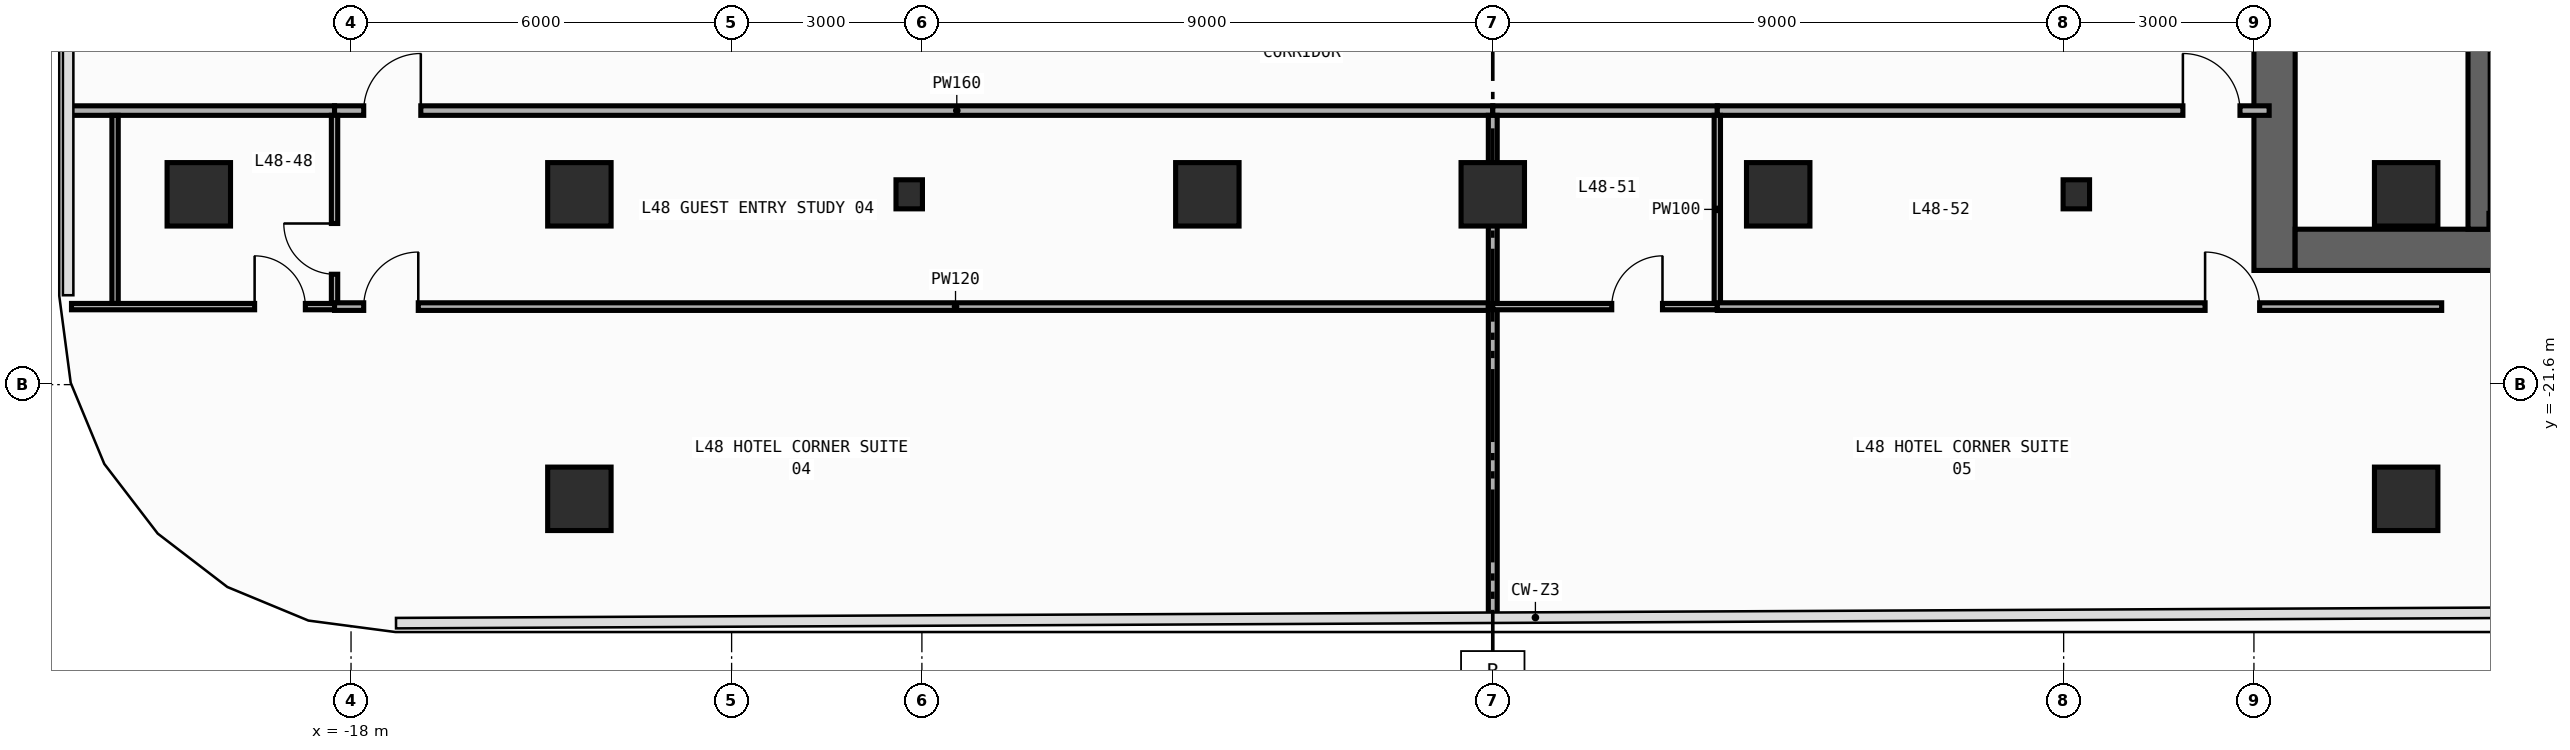
"""IFC4 building model, lengths in metres.
Left out: names, types, materials, properties, quantities, classifications, styles, units other than length and angle.
Written with IfcOpenShell. Run it as: python <this file> out.ifc"""

import sys

from ifc_helpers import new_model, si_unit, direction, frame, frame_2d, origin, origin_2d, place, context, subcontext, project, spatial, rectangle, i_section, extrude, element, fill, save


model = new_model("IFC4")
c1 = context("Model", 3, precision=1e-05, world=origin(), true_north=direction((0.0, 1.0)))
c2 = subcontext(c1, "Body", "Model", "MODEL_VIEW")
j1 = project(units=[si_unit("LENGTHUNIT", "METRE"), si_unit("PLANEANGLEUNIT", "RADIAN")], contexts=[c1])
p1 = place(None, origin())
s1 = spatial("IfcSite", under=j1, at=p1, CompositionType="ELEMENT")
p2 = place(p1, origin())
s2 = spatial("IfcBuilding", under=s1, at=p2, CompositionType="ELEMENT")
p3 = place(p2, frame((0.0, 0.0, 206.8)))
s3 = spatial("IfcBuildingStorey", under=s2, at=p3, CompositionType="ELEMENT", Elevation=206.8)
p4 = place(p3, frame((12.325, -19.8, 0.0), z_axis=(0.0, 0.0, 1.0), x_axis=(0.0, 1.0, 0.0)))
e1 = element("IfcWall", 1, at=p4, inside=s3, PredefinedType="SHEAR", context=c2, shape_type="SweptSolid", body=[
    extrude(rectangle(XDim=27.0, YDim=0.65, at=frame_2d((13.5, 0.0))), origin(), (0.0, 0.0, 1.0), 3.54),
])
p5 = place(p4, frame((23.05, 0.0, 0.0)))
e2 = element("IfcOpeningElement", 2, at=p5, cuts=e1, PredefinedType="OPENING", context=c2, shape_type="SweptSolid", body=[
    extrude(rectangle(XDim=1.1, YDim=2.2, at=frame_2d((0.55, 1.1))), frame((0.0, 0.335, 0.0), z_axis=(0.0, -1.0, 0.0), x_axis=(1.0, 0.0, 0.0)), (0.0, 0.0, 1.0), 0.67),
])
p6 = place(p4, frame((19.85, 0.0, 0.0)))
e3 = element("IfcOpeningElement", 3, at=p6, cuts=e1, PredefinedType="OPENING", context=c2, shape_type="SweptSolid", body=[
    extrude(rectangle(XDim=1.1, YDim=2.2, at=frame_2d((0.55, 1.1))), frame((0.0, 0.335, 0.0), z_axis=(0.0, -1.0, 0.0), x_axis=(1.0, 0.0, 0.0)), (0.0, 0.0, 1.0), 0.67),
])
p7 = place(p4, frame((16.65, 0.0, 0.0)))
e4 = element("IfcOpeningElement", 4, at=p7, cuts=e1, PredefinedType="OPENING", context=c2, shape_type="SweptSolid", body=[
    extrude(rectangle(XDim=1.1, YDim=2.2, at=frame_2d((0.55, 1.1))), frame((0.0, 0.335, 0.0), z_axis=(0.0, -1.0, 0.0), x_axis=(1.0, 0.0, 0.0)), (0.0, 0.0, 1.0), 0.67),
])
p8 = place(p4, frame((7.175, 0.0, 0.0)))
e5 = element("IfcOpeningElement", 5, at=p8, cuts=e1, PredefinedType="OPENING", context=c2, shape_type="SweptSolid", body=[
    extrude(rectangle(XDim=0.85, YDim=2.1, at=frame_2d((0.425, 1.05))), frame((0.0, 0.335, 0.0), z_axis=(0.0, -1.0, 0.0), x_axis=(1.0, 0.0, 0.0)), (0.0, 0.0, 1.0), 0.67),
])
p9 = place(p4, frame((10.375, 0.0, 0.0)))
e6 = element("IfcOpeningElement", 6, at=p9, cuts=e1, PredefinedType="OPENING", context=c2, shape_type="SweptSolid", body=[
    extrude(rectangle(XDim=0.85, YDim=2.1, at=frame_2d((0.425, 1.05))), frame((0.0, 0.335, 0.0), z_axis=(0.0, -1.0, 0.0), x_axis=(1.0, 0.0, 0.0)), (0.0, 0.0, 1.0), 0.67),
])
p10 = place(p4, frame((12.725, 0.0, 0.0)))
e7 = element("IfcOpeningElement", 7, at=p10, cuts=e1, PredefinedType="OPENING", context=c2, shape_type="SweptSolid", body=[
    extrude(rectangle(XDim=1.15, YDim=2.2, at=frame_2d((0.575, 1.1))), frame((0.0, 0.335, 0.0), z_axis=(0.0, -1.0, 0.0), x_axis=(1.0, 0.0, 0.0)), (0.0, 0.0, 1.0), 0.67),
])
p11 = place(p4, frame((25.125, 0.0, 0.0)))
e8 = element("IfcOpeningElement", 8, at=p11, cuts=e1, PredefinedType="OPENING", context=c2, shape_type="SweptSolid", body=[
    extrude(rectangle(XDim=0.85, YDim=2.1, at=frame_2d((0.425, 1.05))), frame((0.0, 0.335, 0.0), z_axis=(0.0, -1.0, 0.0), x_axis=(1.0, 0.0, 0.0)), (0.0, 0.0, 1.0), 0.67),
])
p12 = place(p3, frame((12.65, -19.475, 0.0), z_axis=(0.0, 0.0, 1.0), x_axis=(1.0, 0.0, 0.0)))
e9 = element("IfcWall", 9, at=p12, inside=s3, PredefinedType="SHEAR", context=c2, shape_type="SweptSolid", body=[
    extrude(rectangle(XDim=7.1, YDim=0.65, at=frame_2d((3.55, 0.0))), origin(), (0.0, 0.0, 1.0), 3.54),
])
p13 = place(p3, frame((15.55, -19.15, 0.0), z_axis=(0.0, 0.0, 1.0), x_axis=(0.0, 1.0, 0.0)))
e10 = element("IfcWall", 10, at=p13, inside=s3, PredefinedType="SHEAR", context=c2, shape_type="SweptSolid", body=[
    extrude(rectangle(XDim=25.7, YDim=0.35, at=frame_2d((12.85, 0.0))), origin(), (0.0, 0.0, 1.0), 3.54),
])
p14 = place(p13, frame((12.075, 0.0, 0.0)))
e11 = element("IfcOpeningElement", 11, at=p14, cuts=e10, PredefinedType="OPENING", context=c2, shape_type="SweptSolid", body=[
    extrude(rectangle(XDim=1.15, YDim=2.2, at=frame_2d((0.575, 1.1))), frame((0.0, 0.185, 0.0), z_axis=(0.0, -1.0, 0.0), x_axis=(1.0, 0.0, 0.0)), (0.0, 0.0, 1.0), 0.37),
])
p15 = place(p13, frame((24.475, 0.0, 0.0)))
e12 = element("IfcOpeningElement", 12, at=p15, cuts=e10, PredefinedType="OPENING", context=c2, shape_type="SweptSolid", body=[
    extrude(rectangle(XDim=0.85, YDim=2.1, at=frame_2d((0.425, 1.05))), frame((0.0, 0.185, 0.0), z_axis=(0.0, -1.0, 0.0), x_axis=(1.0, 0.0, 0.0)), (0.0, 0.0, 1.0), 0.37),
])
p16 = place(p3, frame((15.705, -19.01, 0.0), z_axis=(0.0, 0.0, 1.0), x_axis=(1.0, 0.0, 0.0)))
e13 = element("IfcWall", 13, at=p16, inside=s3, PredefinedType="SHEAR", context=c2, shape_type="SweptSolid", body=[
    extrude(rectangle(XDim=4.065, YDim=0.22, at=frame_2d((2.032, 0.0))), origin(), (0.0, 0.0, 1.0), 3.54),
])
for number, where, z_axis, x_axis in (
    (14, (-9.2, -18.6, 0.0), (0.0, 0.0, 1.0), (1.0, 0.0, 0.0)),
    (15, (9.2, -18.6, 0.0), (0.0, 0.0, 1.0), (1.0, 0.0, 0.0)),
):
    element("IfcColumn", number, at=place(p3, frame(where, z_axis=z_axis, x_axis=x_axis)), inside=s3, PredefinedType="COLUMN", context=c2, shape_type="SweptSolid", body=[
        extrude(i_section(OverallWidth=0.417, OverallDepth=0.458, WebThickness=0.03, FlangeThickness=0.05, FilletRadius=0.022, at=origin_2d()), origin(), (0.0, 0.0, 1.0), 3.8),
    ])
for number, where, z_axis, x_axis in (
    (16, (-20.4, -18.6, 0.0), (0.0, 0.0, 1.0), (1.0, 0.0, 0.0)),
    (17, (-14.4, -18.6, 0.0), (0.0, 0.0, 1.0), (1.0, 0.0, 0.0)),
    (18, (14.4, -18.6, 0.0), (0.0, 0.0, 1.0), (1.0, 0.0, 0.0)),
    (19, (-4.5, -18.6, 0.0), (0.0, 0.0, 1.0), (1.0, 0.0, 0.0)),
    (20, (0.0, -18.6, 0.0), (0.0, 0.0, 1.0), (1.0, 0.0, 0.0)),
    (21, (4.5, -18.6, 0.0), (0.0, 0.0, 1.0), (1.0, 0.0, 0.0)),
    (22, (-14.4, -23.4, 0.0), (0.0, 0.0, 1.0), (1.0, 0.0, 0.0)),
    (23, (14.4, -23.4, 0.0), (0.0, 0.0, 1.0), (1.0, 0.0, 0.0)),
):
    element("IfcColumn", number, at=place(p3, frame(where, z_axis=z_axis, x_axis=x_axis)), inside=s3, PredefinedType="COLUMN", context=c2, shape_type="SweptSolid", body=[
        extrude(rectangle(XDim=1.0, YDim=1.0, at=origin_2d()), origin(), (0.0, 0.0, 1.0), 3.8),
    ])
p17 = place(p3, frame((-22.455, -17.28, 0.0), z_axis=(0.0, 0.0, 1.0), x_axis=(1.0, 0.0, 0.0)))
e24 = element("IfcWall", 24, at=p17, inside=s3, PredefinedType="PARTITIONING", context=c2, shape_type="SweptSolid", body=[
    extrude(rectangle(XDim=4.195, YDim=0.15, at=frame_2d((2.098, 0.0))), origin(), (0.0, 0.0, 1.0), 3.54),
])
p18 = place(p3, frame((-18.26, -17.28, 0.0), z_axis=(0.0, 0.0, 1.0), x_axis=(1.0, 0.0, 0.0)))
e25 = element("IfcWall", 25, at=p18, inside=s3, PredefinedType="PARTITIONING", context=c2, shape_type="SweptSolid", body=[
    extrude(rectangle(XDim=18.26, YDim=0.15, at=frame_2d((9.13, 0.0))), origin(), (0.0, 0.0, 1.0), 3.54),
])
p19 = place(p18, frame((0.46, 0.0, 0.0)))
e26 = element("IfcOpeningElement", 26, at=p19, cuts=e25, PredefinedType="OPENING", context=c2, shape_type="SweptSolid", body=[
    extrude(rectangle(XDim=0.9, YDim=2.15, at=frame_2d((0.45, 1.075))), frame((0.0, 0.085, 0.0), z_axis=(0.0, -1.0, 0.0), x_axis=(1.0, 0.0, 0.0)), (0.0, 0.0, 1.0), 0.17),
])
p20 = place(p3, frame((0.0, -17.28, 0.0), z_axis=(0.0, 0.0, 1.0), x_axis=(1.0, 0.0, 0.0)))
e27 = element("IfcWall", 27, at=p20, inside=s3, PredefinedType="PARTITIONING", context=c2, shape_type="SweptSolid", body=[
    extrude(rectangle(XDim=3.54, YDim=0.15, at=frame_2d((1.77, 0.0))), origin(), (0.0, 0.0, 1.0), 3.54),
])
p21 = place(p3, frame((3.54, -17.28, 0.0), z_axis=(0.0, 0.0, 1.0), x_axis=(1.0, 0.0, 0.0)))
e28 = element("IfcWall", 28, at=p21, inside=s3, PredefinedType="PARTITIONING", context=c2, shape_type="SweptSolid", body=[
    extrude(rectangle(XDim=8.7, YDim=0.15, at=frame_2d((4.35, 0.0))), origin(), (0.0, 0.0, 1.0), 3.54),
])
p22 = place(p21, frame((7.34, 0.0, 0.0)))
e29 = element("IfcOpeningElement", 29, at=p22, cuts=e28, PredefinedType="OPENING", context=c2, shape_type="SweptSolid", body=[
    extrude(rectangle(XDim=0.9, YDim=2.15, at=frame_2d((0.45, 1.075))), frame((0.0, 0.085, 0.0), z_axis=(0.0, -1.0, 0.0), x_axis=(1.0, 0.0, 0.0)), (0.0, 0.0, 1.0), 0.17),
])
p23 = place(p3, frame((-18.26, -20.32, 0.0), z_axis=(0.0, 0.0, 1.0), x_axis=(0.0, 1.0, 0.0)))
e30 = element("IfcWall", 30, at=p23, inside=s3, PredefinedType="PARTITIONING", context=c2, shape_type="SweptSolid", body=[
    extrude(rectangle(XDim=2.965, YDim=0.1, at=frame_2d((1.482, 0.0))), origin(), (0.0, 0.0, 1.0), 3.54),
])
p24 = place(p23, frame((0.46, 0.0, 0.0)))
e31 = element("IfcOpeningElement", 31, at=p24, cuts=e30, PredefinedType="OPENING", context=c2, shape_type="SweptSolid", body=[
    extrude(rectangle(XDim=0.8, YDim=2.1, at=frame_2d((0.4, 1.05))), frame((0.0, 0.06, 0.0), z_axis=(0.0, -1.0, 0.0), x_axis=(1.0, 0.0, 0.0)), (0.0, 0.0, 1.0), 0.12),
])
p25 = place(p3, frame((-22.407, -20.37, 0.0), z_axis=(0.0, 0.0, 1.0), x_axis=(1.0, 0.0, 0.0)))
e32 = element("IfcWall", 32, at=p25, inside=s3, PredefinedType="PARTITIONING", context=c2, shape_type="SweptSolid", body=[
    extrude(rectangle(XDim=4.147, YDim=0.1, at=frame_2d((2.073, 0.0))), origin(), (0.0, 0.0, 1.0), 3.54),
])
p26 = place(p25, frame((2.887, 0.0, 0.0)))
e33 = element("IfcOpeningElement", 33, at=p26, cuts=e32, PredefinedType="OPENING", context=c2, shape_type="SweptSolid", body=[
    extrude(rectangle(XDim=0.8, YDim=2.1, at=frame_2d((0.4, 1.05))), frame((0.0, 0.06, 0.0), z_axis=(0.0, -1.0, 0.0), x_axis=(1.0, 0.0, 0.0)), (0.0, 0.0, 1.0), 0.12),
])
p27 = place(p3, frame((-18.26, -20.37, 0.0), z_axis=(0.0, 0.0, 1.0), x_axis=(1.0, 0.0, 0.0)))
e34 = element("IfcWall", 34, at=p27, inside=s3, PredefinedType="PARTITIONING", context=c2, shape_type="SweptSolid", body=[
    extrude(rectangle(XDim=18.26, YDim=0.12, at=frame_2d((9.13, 0.0))), origin(), (0.0, 0.0, 1.0), 3.54),
])
p28 = place(p27, frame((0.46, 0.0, 0.0)))
e35 = element("IfcOpeningElement", 35, at=p28, cuts=e34, PredefinedType="OPENING", context=c2, shape_type="SweptSolid", body=[
    extrude(rectangle(XDim=0.86, YDim=2.15, at=frame_2d((0.43, 1.075))), frame((0.0, 0.07, 0.0), z_axis=(0.0, -1.0, 0.0), x_axis=(1.0, 0.0, 0.0)), (0.0, 0.0, 1.0), 0.14),
])
p29 = place(p3, frame((0.0, -20.37, 0.0), z_axis=(0.0, 0.0, 1.0), x_axis=(0.0, 1.0, 0.0)))
e36 = element("IfcWall", 36, at=p29, inside=s3, PredefinedType="PARTITIONING", context=c2, shape_type="SweptSolid", body=[
    extrude(rectangle(XDim=3.015, YDim=0.14, at=frame_2d((1.508, 0.0))), origin(), (0.0, 0.0, 1.0), 3.54),
])
p30 = place(p3, frame((0.0, -25.27, 0.0), z_axis=(0.0, 0.0, 1.0), x_axis=(0.0, 1.0, 0.0)))
e37 = element("IfcWall", 37, at=p30, inside=s3, PredefinedType="PARTITIONING", context=c2, shape_type="SweptSolid", body=[
    extrude(rectangle(XDim=4.9, YDim=0.14, at=frame_2d((2.45, 0.0))), origin(), (0.0, 0.0, 1.0), 3.54),
])
p31 = place(p3, frame((3.54, -20.32, 0.0), z_axis=(0.0, 0.0, 1.0), x_axis=(0.0, 1.0, 0.0)))
e38 = element("IfcWall", 38, at=p31, inside=s3, PredefinedType="PARTITIONING", context=c2, shape_type="SweptSolid", body=[
    extrude(rectangle(XDim=2.965, YDim=0.1, at=frame_2d((1.482, 0.0))), origin(), (0.0, 0.0, 1.0), 3.54),
])
p32 = place(p3, frame((0.0, -20.37, 0.0), z_axis=(0.0, 0.0, 1.0), x_axis=(1.0, 0.0, 0.0)))
e39 = element("IfcWall", 39, at=p32, inside=s3, PredefinedType="PARTITIONING", context=c2, shape_type="SweptSolid", body=[
    extrude(rectangle(XDim=3.54, YDim=0.1, at=frame_2d((1.77, 0.0))), origin(), (0.0, 0.0, 1.0), 3.54),
])
p33 = place(p32, frame((1.875, 0.0, 0.0)))
e40 = element("IfcOpeningElement", 40, at=p33, cuts=e39, PredefinedType="OPENING", context=c2, shape_type="SweptSolid", body=[
    extrude(rectangle(XDim=0.8, YDim=2.1, at=frame_2d((0.4, 1.05))), frame((0.0, 0.06, 0.0), z_axis=(0.0, -1.0, 0.0), x_axis=(1.0, 0.0, 0.0)), (0.0, 0.0, 1.0), 0.12),
])
p34 = place(p3, frame((3.54, -20.37, 0.0), z_axis=(0.0, 0.0, 1.0), x_axis=(1.0, 0.0, 0.0)))
e41 = element("IfcWall", 41, at=p34, inside=s3, PredefinedType="PARTITIONING", context=c2, shape_type="SweptSolid", body=[
    extrude(rectangle(XDim=11.42, YDim=0.12, at=frame_2d((5.71, 0.0))), origin(), (0.0, 0.0, 1.0), 3.54),
])
p35 = place(p34, frame((7.69, 0.0, 0.0)))
e42 = element("IfcOpeningElement", 42, at=p35, cuts=e41, PredefinedType="OPENING", context=c2, shape_type="SweptSolid", body=[
    extrude(rectangle(XDim=0.86, YDim=2.15, at=frame_2d((0.43, 1.075))), frame((0.0, 0.07, 0.0), z_axis=(0.0, -1.0, 0.0), x_axis=(1.0, 0.0, 0.0)), (0.0, 0.0, 1.0), 0.14),
])
p36 = place(p3, frame((-21.72, -20.32, 0.0), z_axis=(0.0, 0.0, 1.0), x_axis=(0.0, 1.0, 0.0)))
e43 = element("IfcWall", 43, at=p36, inside=s3, PredefinedType="PARTITIONING", context=c2, shape_type="SweptSolid", body=[
    extrude(rectangle(XDim=2.965, YDim=0.1, at=frame_2d((1.482, 0.0))), origin(), (0.0, 0.0, 1.0), 3.54),
])
p37 = place(p19, origin())
e44 = element("IfcDoor", 44, at=p37, inside=s3, OperationType="SINGLE_SWING_RIGHT", PredefinedType="DOOR", context=c2, shape_type="SweptSolid", body=[
    extrude(rectangle(XDim=0.9, YDim=2.15, at=frame_2d((0.45, 1.075))), frame((0.0, 0.025, 0.0), z_axis=(0.0, -1.0, 0.0), x_axis=(1.0, 0.0, 0.0)), (0.0, 0.0, 1.0), 0.05),
])
fill(e26, e44)
p38 = place(p22, origin())
e45 = element("IfcDoor", 45, at=p38, inside=s3, OperationType="SINGLE_SWING_LEFT", PredefinedType="DOOR", context=c2, shape_type="SweptSolid", body=[
    extrude(rectangle(XDim=0.9, YDim=2.15, at=frame_2d((0.45, 1.075))), frame((0.0, 0.025, 0.0), z_axis=(0.0, -1.0, 0.0), x_axis=(1.0, 0.0, 0.0)), (0.0, 0.0, 1.0), 0.05),
])
fill(e29, e45)
p39 = place(p24, origin())
e46 = element("IfcDoor", 46, at=p39, inside=s3, OperationType="SINGLE_SWING_RIGHT", PredefinedType="DOOR", context=c2, shape_type="SweptSolid", body=[
    extrude(rectangle(XDim=0.8, YDim=2.1, at=frame_2d((0.4, 1.05))), frame((0.0, 0.025, 0.0), z_axis=(0.0, -1.0, 0.0), x_axis=(1.0, 0.0, 0.0)), (0.0, 0.0, 1.0), 0.05),
])
fill(e31, e46)
p40 = place(p26, origin())
e47 = element("IfcDoor", 47, at=p40, inside=s3, OperationType="SINGLE_SWING_LEFT", PredefinedType="DOOR", context=c2, shape_type="SweptSolid", body=[
    extrude(rectangle(XDim=0.8, YDim=2.1, at=frame_2d((0.4, 1.05))), frame((0.0, 0.025, 0.0), z_axis=(0.0, -1.0, 0.0), x_axis=(1.0, 0.0, 0.0)), (0.0, 0.0, 1.0), 0.05),
])
fill(e33, e47)
p41 = place(p28, origin())
e48 = element("IfcDoor", 48, at=p41, inside=s3, OperationType="SINGLE_SWING_RIGHT", PredefinedType="DOOR", context=c2, shape_type="SweptSolid", body=[
    extrude(rectangle(XDim=0.86, YDim=2.15, at=frame_2d((0.43, 1.075))), frame((0.0, 0.025, 0.0), z_axis=(0.0, -1.0, 0.0), x_axis=(1.0, 0.0, 0.0)), (0.0, 0.0, 1.0), 0.05),
])
fill(e35, e48)
p42 = place(p33, origin())
e49 = element("IfcDoor", 49, at=p42, inside=s3, OperationType="SINGLE_SWING_RIGHT", PredefinedType="DOOR", context=c2, shape_type="SweptSolid", body=[
    extrude(rectangle(XDim=0.8, YDim=2.1, at=frame_2d((0.4, 1.05))), frame((0.0, 0.025, 0.0), z_axis=(0.0, -1.0, 0.0), x_axis=(1.0, 0.0, 0.0)), (0.0, 0.0, 1.0), 0.05),
])
fill(e40, e49)
p43 = place(p35, origin())
e50 = element("IfcDoor", 50, at=p43, inside=s3, OperationType="SINGLE_SWING_LEFT", PredefinedType="DOOR", context=c2, shape_type="SweptSolid", body=[
    extrude(rectangle(XDim=0.86, YDim=2.15, at=frame_2d((0.43, 1.075))), frame((0.0, 0.025, 0.0), z_axis=(0.0, -1.0, 0.0), x_axis=(1.0, 0.0, 0.0)), (0.0, 0.0, 1.0), 0.05),
])
fill(e42, e50)
save(model, sys.argv[1])
